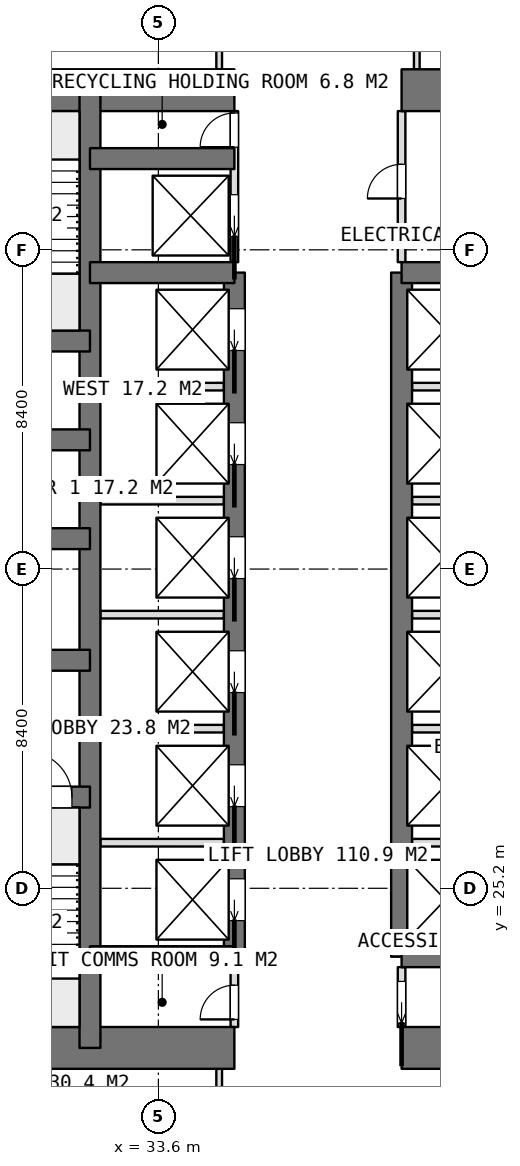
"""IFC4 building model, lengths in metres.
Left out: names, types, materials, properties, quantities, classifications, styles, units other than length and angle.
Written with IfcOpenShell. Run it as: python <this file> out.ifc"""

import sys

from ifc_helpers import new_model, si_unit, direction, frame, frame_2d, origin, place, context, subcontext, project, spatial, rectangle, extrude, element, fill, save


model = new_model("IFC4")
c1 = context("Model", 3, precision=1e-05, world=origin(), true_north=direction((0.0, 1.0)))
c2 = subcontext(c1, "Body", "Model", "MODEL_VIEW")
j1 = project(units=[si_unit("LENGTHUNIT", "METRE"), si_unit("PLANEANGLEUNIT", "RADIAN")], contexts=[c1])
p1 = place(None, origin())
s1 = spatial("IfcSite", under=j1, at=p1, CompositionType="ELEMENT")
p2 = place(p1, origin())
s2 = spatial("IfcBuilding", under=s1, at=p2, CompositionType="ELEMENT")
p3 = place(p2, frame((0.0, 0.0, 44.15)))
s3 = spatial("IfcBuildingStorey", under=s2, at=p3, CompositionType="ELEMENT", Elevation=44.15)
p4 = place(p3, frame((25.2, 21.0, 0.0), z_axis=(0.0, 0.0, 1.0), x_axis=(1.0, 0.0, 0.0)))
e1 = element("IfcWall", 1, at=p4, inside=s3, PredefinedType="SHEAR", context=c2, shape_type="SweptSolid", body=[
    extrude(rectangle(XDim=10.4, YDim=1.1, at=frame_2d((5.2, 0.0))), origin(), (0.0, 0.0, 1.0), 3.75),
])
p5 = place(p3, frame((40.0, 21.0, 0.0), z_axis=(0.0, 0.0, 1.0), x_axis=(1.0, 0.0, 0.0)))
e2 = element("IfcWall", 2, at=p5, inside=s3, PredefinedType="SHEAR", context=c2, shape_type="SweptSolid", body=[
    extrude(rectangle(XDim=10.4, YDim=1.1, at=frame_2d((5.2, 0.0))), origin(), (0.0, 0.0, 1.0), 3.75),
])
p6 = place(p3, frame((25.2, 46.2, 0.0), z_axis=(0.0, 0.0, 1.0), x_axis=(1.0, 0.0, 0.0)))
e3 = element("IfcWall", 3, at=p6, inside=s3, PredefinedType="SHEAR", context=c2, shape_type="SweptSolid", body=[
    extrude(rectangle(XDim=10.4, YDim=1.1, at=frame_2d((5.2, 0.0))), origin(), (0.0, 0.0, 1.0), 3.75),
])
p7 = place(p3, frame((40.0, 46.2, 0.0), z_axis=(0.0, 0.0, 1.0), x_axis=(1.0, 0.0, 0.0)))
e4 = element("IfcWall", 4, at=p7, inside=s3, PredefinedType="SHEAR", context=c2, shape_type="SweptSolid", body=[
    extrude(rectangle(XDim=10.4, YDim=1.1, at=frame_2d((5.2, 0.0))), origin(), (0.0, 0.0, 1.0), 3.75),
])
p8 = place(p3, frame((31.8, 21.0, 0.0), z_axis=(0.0, 0.0, 1.0), x_axis=(0.0, 1.0, 0.0)))
e5 = element("IfcWall", 5, at=p8, inside=s3, PredefinedType="SHEAR", context=c2, shape_type="SweptSolid", body=[
    extrude(rectangle(XDim=25.2, YDim=0.55, at=frame_2d((12.6, 0.0))), origin(), (0.0, 0.0, 1.0), 3.75),
])
p9 = place(p3, frame((35.6, 23.4, 0.0), z_axis=(0.0, 0.0, 1.0), x_axis=(0.0, 1.0, 0.0)))
e6 = element("IfcWall", 6, at=p9, inside=s3, PredefinedType="SHEAR", context=c2, shape_type="SweptSolid", body=[
    extrude(rectangle(XDim=18.0, YDim=0.55, at=frame_2d((9.0, 0.0))), origin(), (0.0, 0.0, 1.0), 3.75),
])
p10 = place(p9, frame((0.95, 0.0, 0.0)))
e7 = element("IfcOpeningElement", 7, at=p10, cuts=e6, PredefinedType="OPENING", context=c2, shape_type="SweptSolid", body=[
    extrude(rectangle(XDim=1.1, YDim=2.1, at=frame_2d((0.55, 1.05))), frame((0.0, 0.285, 0.0), z_axis=(0.0, -1.0, 0.0), x_axis=(1.0, 0.0, 0.0)), (0.0, 0.0, 1.0), 0.57),
])
p11 = place(p9, frame((3.95, 0.0, 0.0)))
e8 = element("IfcOpeningElement", 8, at=p11, cuts=e6, PredefinedType="OPENING", context=c2, shape_type="SweptSolid", body=[
    extrude(rectangle(XDim=1.1, YDim=2.1, at=frame_2d((0.55, 1.05))), frame((0.0, 0.285, 0.0), z_axis=(0.0, -1.0, 0.0), x_axis=(1.0, 0.0, 0.0)), (0.0, 0.0, 1.0), 0.57),
])
p12 = place(p9, frame((6.95, 0.0, 0.0)))
e9 = element("IfcOpeningElement", 9, at=p12, cuts=e6, PredefinedType="OPENING", context=c2, shape_type="SweptSolid", body=[
    extrude(rectangle(XDim=1.1, YDim=2.1, at=frame_2d((0.55, 1.05))), frame((0.0, 0.285, 0.0), z_axis=(0.0, -1.0, 0.0), x_axis=(1.0, 0.0, 0.0)), (0.0, 0.0, 1.0), 0.57),
])
p13 = place(p9, frame((9.95, 0.0, 0.0)))
e10 = element("IfcOpeningElement", 10, at=p13, cuts=e6, PredefinedType="OPENING", context=c2, shape_type="SweptSolid", body=[
    extrude(rectangle(XDim=1.1, YDim=2.1, at=frame_2d((0.55, 1.05))), frame((0.0, 0.285, 0.0), z_axis=(0.0, -1.0, 0.0), x_axis=(1.0, 0.0, 0.0)), (0.0, 0.0, 1.0), 0.57),
])
p14 = place(p9, frame((12.95, 0.0, 0.0)))
e11 = element("IfcOpeningElement", 11, at=p14, cuts=e6, PredefinedType="OPENING", context=c2, shape_type="SweptSolid", body=[
    extrude(rectangle(XDim=1.1, YDim=2.1, at=frame_2d((0.55, 1.05))), frame((0.0, 0.285, 0.0), z_axis=(0.0, -1.0, 0.0), x_axis=(1.0, 0.0, 0.0)), (0.0, 0.0, 1.0), 0.57),
])
p15 = place(p9, frame((15.95, 0.0, 0.0)))
e12 = element("IfcOpeningElement", 12, at=p15, cuts=e6, PredefinedType="OPENING", context=c2, shape_type="SweptSolid", body=[
    extrude(rectangle(XDim=1.1, YDim=2.1, at=frame_2d((0.55, 1.05))), frame((0.0, 0.285, 0.0), z_axis=(0.0, -1.0, 0.0), x_axis=(1.0, 0.0, 0.0)), (0.0, 0.0, 1.0), 0.57),
])
p16 = place(p3, frame((40.0, 23.4, 0.0), z_axis=(0.0, 0.0, 1.0), x_axis=(0.0, 1.0, 0.0)))
e13 = element("IfcWall", 13, at=p16, inside=s3, PredefinedType="SHEAR", context=c2, shape_type="SweptSolid", body=[
    extrude(rectangle(XDim=18.0, YDim=0.55, at=frame_2d((9.0, 0.0))), origin(), (0.0, 0.0, 1.0), 3.75),
])
for number, where, z_axis, x_axis in (
    (14, (31.8, 23.4, 0.0), (0.0, 0.0, 1.0), (1.0, 0.0, 0.0)),
    (15, (31.8, 41.4, 0.0), (0.0, 0.0, 1.0), (1.0, 0.0, 0.0)),
    (16, (31.8, 44.4, 0.0), (0.0, 0.0, 1.0), (1.0, 0.0, 0.0)),
    (17, (40.0, 23.4, 0.0), (0.0, 0.0, 1.0), (1.0, 0.0, 0.0)),
    (18, (40.0, 41.4, 0.0), (0.0, 0.0, 1.0), (1.0, 0.0, 0.0)),
):
    element("IfcWall", number, at=place(p3, frame(where, z_axis=z_axis, x_axis=x_axis)), inside=s3, PredefinedType="SHEAR", context=c2, shape_type="SweptSolid", body=[
        extrude(rectangle(XDim=3.8, YDim=0.55, at=frame_2d((1.9, 0.0))), origin(), (0.0, 0.0, 1.0), 3.75),
    ])
p17 = place(p3, frame((25.2, 27.6, 0.0), z_axis=(0.0, 0.0, 1.0), x_axis=(1.0, 0.0, 0.0)))
e19 = element("IfcWall", 19, at=p17, inside=s3, PredefinedType="SHEAR", context=c2, shape_type="SweptSolid", body=[
    extrude(rectangle(XDim=6.6, YDim=0.55, at=frame_2d((3.3, 0.0))), origin(), (0.0, 0.0, 1.0), 3.75),
])
p18 = place(p17, frame((4.925, 0.0, 0.0)))
e20 = element("IfcOpeningElement", 20, at=p18, cuts=e19, PredefinedType="OPENING", context=c2, shape_type="SweptSolid", body=[
    extrude(rectangle(XDim=1.2, YDim=2.1, at=frame_2d((0.6, 1.05))), frame((0.0, 0.285, 0.0), z_axis=(0.0, -1.0, 0.0), x_axis=(1.0, 0.0, 0.0)), (0.0, 0.0, 1.0), 0.57),
])
p19 = place(p3, frame((25.2, 31.2, 0.0), z_axis=(0.0, 0.0, 1.0), x_axis=(1.0, 0.0, 0.0)))
e21 = element("IfcWall", 21, at=p19, inside=s3, PredefinedType="SHEAR", context=c2, shape_type="SweptSolid", body=[
    extrude(rectangle(XDim=6.6, YDim=0.55, at=frame_2d((3.3, 0.0))), origin(), (0.0, 0.0, 1.0), 3.75),
])
p20 = place(p19, frame((2.65, 0.0, 0.0)))
e22 = element("IfcOpeningElement", 22, at=p20, cuts=e21, PredefinedType="OPENING", context=c2, shape_type="SweptSolid", body=[
    extrude(rectangle(XDim=1.3, YDim=2.1, at=frame_2d((0.65, 1.05))), frame((0.0, 0.285, 0.0), z_axis=(0.0, -1.0, 0.0), x_axis=(1.0, 0.0, 0.0)), (0.0, 0.0, 1.0), 0.57),
])
for number, where, z_axis, x_axis in (
    (23, (25.2, 34.4, 0.0), (0.0, 0.0, 1.0), (1.0, 0.0, 0.0)),
    (24, (25.2, 37.0, 0.0), (0.0, 0.0, 1.0), (1.0, 0.0, 0.0)),
    (25, (25.2, 39.6, 0.0), (0.0, 0.0, 1.0), (1.0, 0.0, 0.0)),
):
    element("IfcWall", number, at=place(p3, frame(where, z_axis=z_axis, x_axis=x_axis)), inside=s3, PredefinedType="SHEAR", context=c2, shape_type="SweptSolid", body=[
        extrude(rectangle(XDim=6.6, YDim=0.55, at=frame_2d((3.3, 0.0))), origin(), (0.0, 0.0, 1.0), 3.75),
    ])
for number, where, z_axis, x_axis in (
    (26, (32.075, 26.4, 0.0), (0.0, 0.0, 1.0), (1.0, 0.0, 0.0)),
    (27, (32.075, 29.4, 0.0), (0.0, 0.0, 1.0), (1.0, 0.0, 0.0)),
    (28, (32.075, 32.4, 0.0), (0.0, 0.0, 1.0), (1.0, 0.0, 0.0)),
    (29, (32.075, 35.4, 0.0), (0.0, 0.0, 1.0), (1.0, 0.0, 0.0)),
    (30, (32.075, 38.4, 0.0), (0.0, 0.0, 1.0), (1.0, 0.0, 0.0)),
    (31, (40.275, 26.4, 0.0), (0.0, 0.0, 1.0), (1.0, 0.0, 0.0)),
    (32, (40.275, 29.4, 0.0), (0.0, 0.0, 1.0), (1.0, 0.0, 0.0)),
    (33, (40.275, 32.4, 0.0), (0.0, 0.0, 1.0), (1.0, 0.0, 0.0)),
    (34, (40.275, 35.4, 0.0), (0.0, 0.0, 1.0), (1.0, 0.0, 0.0)),
    (35, (40.275, 38.4, 0.0), (0.0, 0.0, 1.0), (1.0, 0.0, 0.0)),
):
    element("IfcWall", number, at=place(p3, frame(where, z_axis=z_axis, x_axis=x_axis)), inside=s3, PredefinedType="PARTITIONING", context=c2, shape_type="SweptSolid", body=[
        extrude(rectangle(XDim=3.25, YDim=0.2, at=frame_2d((1.625, 0.0))), origin(), (0.0, 0.0, 1.0), 3.5),
    ])
p21 = place(p3, frame((40.0, 21.55, 0.0), z_axis=(0.0, 0.0, 1.0), x_axis=(0.0, 1.0, 0.0)))
e36 = element("IfcWall", 36, at=p21, inside=s3, PredefinedType="PARTITIONING", context=c2, shape_type="SweptSolid", body=[
    extrude(rectangle(XDim=1.575, YDim=0.2, at=frame_2d((0.788, 0.0))), origin(), (0.0, 0.0, 1.0), 3.5),
])
p22 = place(p21, frame((0.1, 0.0, 0.0)))
e37 = element("IfcOpeningElement", 37, at=p22, cuts=e36, PredefinedType="OPENING", context=c2, shape_type="SweptSolid", body=[
    extrude(rectangle(XDim=1.1, YDim=2.1, at=frame_2d((0.55, 1.05))), frame((0.0, 0.11, 0.0), z_axis=(0.0, -1.0, 0.0), x_axis=(1.0, 0.0, 0.0)), (0.0, 0.0, 1.0), 0.22),
])
p23 = place(p3, frame((40.0, 41.675, 0.0), z_axis=(0.0, 0.0, 1.0), x_axis=(0.0, 1.0, 0.0)))
e38 = element("IfcWall", 38, at=p23, inside=s3, PredefinedType="PARTITIONING", context=c2, shape_type="SweptSolid", body=[
    extrude(rectangle(XDim=3.975, YDim=0.2, at=frame_2d((1.987, 0.0))), origin(), (0.0, 0.0, 1.0), 3.5),
])
p24 = place(p23, frame((1.675, 0.0, 0.0)))
e39 = element("IfcOpeningElement", 39, at=p24, cuts=e38, PredefinedType="OPENING", context=c2, shape_type="SweptSolid", body=[
    extrude(rectangle(XDim=0.9, YDim=2.1, at=frame_2d((0.45, 1.05))), frame((0.0, 0.11, 0.0), z_axis=(0.0, -1.0, 0.0), x_axis=(1.0, 0.0, 0.0)), (0.0, 0.0, 1.0), 0.22),
])
p25 = place(p3, frame((35.6, 41.675, 0.0), z_axis=(0.0, 0.0, 1.0), x_axis=(0.0, 1.0, 0.0)))
e40 = element("IfcWall", 40, at=p25, inside=s3, PredefinedType="PARTITIONING", context=c2, shape_type="SweptSolid", body=[
    extrude(rectangle(XDim=3.975, YDim=0.2, at=frame_2d((1.987, 0.0))), origin(), (0.0, 0.0, 1.0), 3.5),
])
p26 = place(p25, frame((3.025, 0.0, 0.0)))
e41 = element("IfcOpeningElement", 41, at=p26, cuts=e40, PredefinedType="OPENING", context=c2, shape_type="SweptSolid", body=[
    extrude(rectangle(XDim=0.9, YDim=2.1, at=frame_2d((0.45, 1.05))), frame((0.0, 0.11, 0.0), z_axis=(0.0, -1.0, 0.0), x_axis=(1.0, 0.0, 0.0)), (0.0, 0.0, 1.0), 0.22),
])
p27 = place(p25, frame((0.675, 0.0, 0.0)))
e42 = element("IfcOpeningElement", 42, at=p27, cuts=e40, PredefinedType="OPENING", context=c2, shape_type="SweptSolid", body=[
    extrude(rectangle(XDim=1.1, YDim=2.1, at=frame_2d((0.55, 1.05))), frame((0.0, 0.11, 0.0), z_axis=(0.0, -1.0, 0.0), x_axis=(1.0, 0.0, 0.0)), (0.0, 0.0, 1.0), 0.22),
])
p28 = place(p3, frame((35.6, 21.55, 0.0), z_axis=(0.0, 0.0, 1.0), x_axis=(0.0, 1.0, 0.0)))
e43 = element("IfcWall", 43, at=p28, inside=s3, PredefinedType="PARTITIONING", context=c2, shape_type="SweptSolid", body=[
    extrude(rectangle(XDim=1.575, YDim=0.2, at=frame_2d((0.788, 0.0))), origin(), (0.0, 0.0, 1.0), 3.5),
])
p29 = place(p28, frame((0.2, 0.0, 0.0)))
e44 = element("IfcOpeningElement", 44, at=p29, cuts=e43, PredefinedType="OPENING", context=c2, shape_type="SweptSolid", body=[
    extrude(rectangle(XDim=0.9, YDim=2.1, at=frame_2d((0.45, 1.05))), frame((0.0, 0.11, 0.0), z_axis=(0.0, -1.0, 0.0), x_axis=(1.0, 0.0, 0.0)), (0.0, 0.0, 1.0), 0.22),
])
for number, where, z_axis, x_axis in (
    (45, (40.4, 46.75, 0.0), (0.0, 0.0, 1.0), (0.0, 1.0, 0.0)),
    (46, (35.2, 46.75, 0.0), (0.0, 0.0, 1.0), (0.0, 1.0, 0.0)),
    (47, (35.2, 17.875, 0.0), (0.0, 0.0, 1.0), (0.0, 1.0, 0.0)),
):
    element("IfcWall", number, at=place(p3, frame(where, z_axis=z_axis, x_axis=x_axis)), inside=s3, PredefinedType="PARTITIONING", context=c2, shape_type="SweptSolid", body=[
        extrude(rectangle(XDim=2.575, YDim=0.15, at=frame_2d((1.288, 0.0))), origin(), (0.0, 0.0, 1.0), 3.5),
    ])
p30 = place(p22, origin())
e48 = element("IfcDoor", 48, at=p30, inside=s3, OperationType="SLIDING_TO_LEFT", PredefinedType="DOOR", context=c2, shape_type="SweptSolid", body=[
    extrude(rectangle(XDim=1.1, YDim=2.1, at=frame_2d((0.55, 1.05))), frame((0.0, 0.025, 0.0), z_axis=(0.0, -1.0, 0.0), x_axis=(1.0, 0.0, 0.0)), (0.0, 0.0, 1.0), 0.05),
])
fill(e37, e48)
p31 = place(p29, origin())
e49 = element("IfcDoor", 49, at=p31, inside=s3, OperationType="SINGLE_SWING_LEFT", PredefinedType="DOOR", context=c2, shape_type="SweptSolid", body=[
    extrude(rectangle(XDim=0.9, YDim=2.1, at=frame_2d((0.45, 1.05))), frame((0.0, 0.025, 0.0), z_axis=(0.0, -1.0, 0.0), x_axis=(1.0, 0.0, 0.0)), (0.0, 0.0, 1.0), 0.05),
])
fill(e44, e49)
p32 = place(p24, origin())
e50 = element("IfcDoor", 50, at=p32, inside=s3, OperationType="SINGLE_SWING_LEFT", PredefinedType="DOOR", context=c2, shape_type="SweptSolid", body=[
    extrude(rectangle(XDim=0.9, YDim=2.1, at=frame_2d((0.45, 1.05))), frame((0.0, 0.025, 0.0), z_axis=(0.0, -1.0, 0.0), x_axis=(1.0, 0.0, 0.0)), (0.0, 0.0, 1.0), 0.05),
])
fill(e39, e50)
p33 = place(p26, origin())
e51 = element("IfcDoor", 51, at=p33, inside=s3, OperationType="SINGLE_SWING_LEFT", PredefinedType="DOOR", context=c2, shape_type="SweptSolid", body=[
    extrude(rectangle(XDim=0.9, YDim=2.1, at=frame_2d((0.45, 1.05))), frame((0.0, 0.025, 0.0), z_axis=(0.0, -1.0, 0.0), x_axis=(1.0, 0.0, 0.0)), (0.0, 0.0, 1.0), 0.05),
])
fill(e41, e51)
p34 = place(p10, origin())
e52 = element("IfcDoor", 52, at=p34, inside=s3, OperationType="SLIDING_TO_LEFT", PredefinedType="USERDEFINED", context=c2, shape_type="SweptSolid", body=[
    extrude(rectangle(XDim=1.1, YDim=2.1, at=frame_2d((0.55, 1.05))), frame((0.0, 0.025, 0.0), z_axis=(0.0, -1.0, 0.0), x_axis=(1.0, 0.0, 0.0)), (0.0, 0.0, 1.0), 0.05),
])
fill(e7, e52)
p35 = place(p11, origin())
e53 = element("IfcDoor", 53, at=p35, inside=s3, OperationType="SLIDING_TO_LEFT", PredefinedType="USERDEFINED", context=c2, shape_type="SweptSolid", body=[
    extrude(rectangle(XDim=1.1, YDim=2.1, at=frame_2d((0.55, 1.05))), frame((0.0, 0.025, 0.0), z_axis=(0.0, -1.0, 0.0), x_axis=(1.0, 0.0, 0.0)), (0.0, 0.0, 1.0), 0.05),
])
fill(e8, e53)
p36 = place(p12, origin())
e54 = element("IfcDoor", 54, at=p36, inside=s3, OperationType="SLIDING_TO_LEFT", PredefinedType="USERDEFINED", context=c2, shape_type="SweptSolid", body=[
    extrude(rectangle(XDim=1.1, YDim=2.1, at=frame_2d((0.55, 1.05))), frame((0.0, 0.025, 0.0), z_axis=(0.0, -1.0, 0.0), x_axis=(1.0, 0.0, 0.0)), (0.0, 0.0, 1.0), 0.05),
])
fill(e9, e54)
p37 = place(p13, origin())
e55 = element("IfcDoor", 55, at=p37, inside=s3, OperationType="SLIDING_TO_LEFT", PredefinedType="USERDEFINED", context=c2, shape_type="SweptSolid", body=[
    extrude(rectangle(XDim=1.1, YDim=2.1, at=frame_2d((0.55, 1.05))), frame((0.0, 0.025, 0.0), z_axis=(0.0, -1.0, 0.0), x_axis=(1.0, 0.0, 0.0)), (0.0, 0.0, 1.0), 0.05),
])
fill(e10, e55)
p38 = place(p14, origin())
e56 = element("IfcDoor", 56, at=p38, inside=s3, OperationType="SLIDING_TO_LEFT", PredefinedType="USERDEFINED", context=c2, shape_type="SweptSolid", body=[
    extrude(rectangle(XDim=1.1, YDim=2.1, at=frame_2d((0.55, 1.05))), frame((0.0, 0.025, 0.0), z_axis=(0.0, -1.0, 0.0), x_axis=(1.0, 0.0, 0.0)), (0.0, 0.0, 1.0), 0.05),
])
fill(e11, e56)
p39 = place(p15, origin())
e57 = element("IfcDoor", 57, at=p39, inside=s3, OperationType="SLIDING_TO_LEFT", PredefinedType="USERDEFINED", context=c2, shape_type="SweptSolid", body=[
    extrude(rectangle(XDim=1.1, YDim=2.1, at=frame_2d((0.55, 1.05))), frame((0.0, 0.025, 0.0), z_axis=(0.0, -1.0, 0.0), x_axis=(1.0, 0.0, 0.0)), (0.0, 0.0, 1.0), 0.05),
])
fill(e12, e57)
p40 = place(p27, origin())
e58 = element("IfcDoor", 58, at=p40, inside=s3, OperationType="SLIDING_TO_LEFT", PredefinedType="USERDEFINED", context=c2, shape_type="SweptSolid", body=[
    extrude(rectangle(XDim=1.1, YDim=2.1, at=frame_2d((0.55, 1.05))), frame((0.0, 0.025, 0.0), z_axis=(0.0, -1.0, 0.0), x_axis=(1.0, 0.0, 0.0)), (0.0, 0.0, 1.0), 0.05),
])
fill(e42, e58)
p41 = place(p18, origin())
e59 = element("IfcDoor", 59, at=p41, inside=s3, OperationType="SINGLE_SWING_RIGHT", PredefinedType="DOOR", context=c2, shape_type="SweptSolid", body=[
    extrude(rectangle(XDim=1.2, YDim=2.1, at=frame_2d((0.6, 1.05))), frame((0.0, 0.025, 0.0), z_axis=(0.0, -1.0, 0.0), x_axis=(1.0, 0.0, 0.0)), (0.0, 0.0, 1.0), 0.05),
])
fill(e20, e59)
save(model, sys.argv[1])
